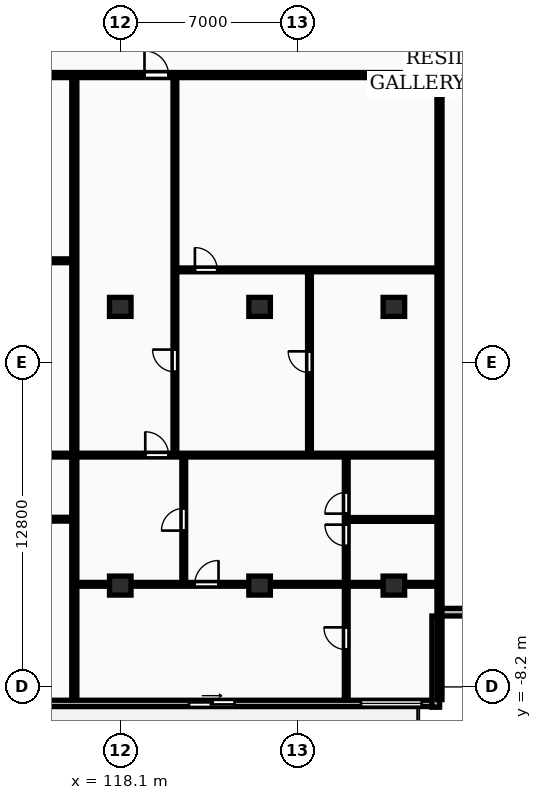
"""IFC4 building model, lengths in metres.
Left out: names, types, materials, properties, quantities, classifications, styles, units other than length and angle.
Written with IfcOpenShell. Run it as: python <this file> out.ifc"""

import sys

from ifc_helpers import new_model, si_unit, direction, frame, frame_2d, origin, origin_2d, place, context, subcontext, project, spatial, rectangle, extrude, element, fill, save


model = new_model("IFC4")
c1 = context("Model", 3, precision=1e-05, world=origin(), true_north=direction((0.0, 1.0)))
c2 = subcontext(c1, "Body", "Model", "MODEL_VIEW")
j1 = project(units=[si_unit("LENGTHUNIT", "METRE"), si_unit("PLANEANGLEUNIT", "RADIAN")], contexts=[c1])
p1 = place(None, origin())
s1 = spatial("IfcSite", under=j1, at=p1, CompositionType="ELEMENT")
p2 = place(p1, origin())
s2 = spatial("IfcBuilding", under=s1, at=p2, CompositionType="ELEMENT")
p3 = place(p2, frame((0.0, 0.0, 126.3)))
s3 = spatial("IfcBuildingStorey", under=s2, at=p3, CompositionType="ELEMENT", Elevation=126.3)
for number, where, z_axis, x_axis in (
    (1, (118.1, -4.2, 0.0), (0.0, 0.0, 1.0), (1.0, 0.0, 0.0)),
    (2, (118.1, 6.8, 0.0), (0.0, 0.0, 1.0), (1.0, 0.0, 0.0)),
    (3, (123.6, -4.2, 0.0), (0.0, 0.0, 1.0), (1.0, 0.0, 0.0)),
    (4, (123.6, 6.8, 0.0), (0.0, 0.0, 1.0), (1.0, 0.0, 0.0)),
    (5, (128.9, -4.2, 0.0), (0.0, 0.0, 1.0), (1.0, 0.0, 0.0)),
    (6, (128.9, 6.8, 0.0), (0.0, 0.0, 1.0), (1.0, 0.0, 0.0)),
):
    element("IfcColumn", number, at=place(p3, frame(where, z_axis=z_axis, x_axis=x_axis)), inside=s3, PredefinedType="COLUMN", context=c2, shape_type="SweptSolid", body=[
        extrude(rectangle(XDim=0.85, YDim=0.75, at=origin_2d()), origin(), (0.0, 0.0, 1.0), 3.25),
    ])
p4 = place(p3, frame((72.7, -8.85, 0.0), z_axis=(0.0, 0.0, 1.0), x_axis=(1.0, 0.0, 0.0)))
e7 = element("IfcWall", 7, at=p4, inside=s3, PredefinedType="STANDARD", context=c2, shape_type="SweptSolid", body=[
    extrude(rectangle(XDim=58.0, YDim=0.25, at=frame_2d((29.0, 0.0))), origin(), (0.0, 0.0, 1.0), 2.97),
])
p5 = place(p4, frame((5.77, 0.0, 0.85)))
e8 = element("IfcOpeningElement", 8, at=p5, cuts=e7, PredefinedType="OPENING", context=c2, shape_type="SweptSolid", body=[
    extrude(rectangle(XDim=2.4, YDim=1.9, at=frame_2d((1.2, 0.95))), frame((0.0, 0.135, 0.0), z_axis=(0.0, -1.0, 0.0), x_axis=(1.0, 0.0, 0.0)), (0.0, 0.0, 1.0), 0.27),
])
p6 = place(p4, frame((10.97, 0.0, 0.85)))
e9 = element("IfcOpeningElement", 9, at=p6, cuts=e7, PredefinedType="OPENING", context=c2, shape_type="SweptSolid", body=[
    extrude(rectangle(XDim=2.4, YDim=1.9, at=frame_2d((1.2, 0.95))), frame((0.0, 0.135, 0.0), z_axis=(0.0, -1.0, 0.0), x_axis=(1.0, 0.0, 0.0)), (0.0, 0.0, 1.0), 0.27),
])
p7 = place(p4, frame((16.387, 0.0, 0.85)))
e10 = element("IfcOpeningElement", 10, at=p7, cuts=e7, PredefinedType="OPENING", context=c2, shape_type="SweptSolid", body=[
    extrude(rectangle(XDim=2.4, YDim=1.9, at=frame_2d((1.2, 0.95))), frame((0.0, 0.135, 0.0), z_axis=(0.0, -1.0, 0.0), x_axis=(1.0, 0.0, 0.0)), (0.0, 0.0, 1.0), 0.27),
])
p8 = place(p4, frame((1.345, 0.0, 0.0)))
e11 = element("IfcOpeningElement", 11, at=p8, cuts=e7, PredefinedType="OPENING", context=c2, shape_type="SweptSolid", body=[
    extrude(rectangle(XDim=1.8, YDim=2.2, at=frame_2d((0.9, 1.1))), frame((0.0, 0.135, 0.0), z_axis=(0.0, -1.0, 0.0), x_axis=(1.0, 0.0, 0.0)), (0.0, 0.0, 1.0), 0.27),
])
p9 = place(p4, frame((21.419, 0.0, 0.85)))
e12 = element("IfcOpeningElement", 12, at=p9, cuts=e7, PredefinedType="OPENING", context=c2, shape_type="SweptSolid", body=[
    extrude(rectangle(XDim=2.4, YDim=1.9, at=frame_2d((1.2, 0.95))), frame((0.0, 0.135, 0.0), z_axis=(0.0, -1.0, 0.0), x_axis=(1.0, 0.0, 0.0)), (0.0, 0.0, 1.0), 0.27),
])
p10 = place(p4, frame((30.827, 0.0, 0.85)))
e13 = element("IfcOpeningElement", 13, at=p10, cuts=e7, PredefinedType="OPENING", context=c2, shape_type="SweptSolid", body=[
    extrude(rectangle(XDim=2.4, YDim=1.9, at=frame_2d((1.2, 0.95))), frame((0.0, 0.135, 0.0), z_axis=(0.0, -1.0, 0.0), x_axis=(1.0, 0.0, 0.0)), (0.0, 0.0, 1.0), 0.27),
])
p11 = place(p4, frame((35.688, 0.0, 0.85)))
e14 = element("IfcOpeningElement", 14, at=p11, cuts=e7, PredefinedType="OPENING", context=c2, shape_type="SweptSolid", body=[
    extrude(rectangle(XDim=2.4, YDim=1.9, at=frame_2d((1.2, 0.95))), frame((0.0, 0.135, 0.0), z_axis=(0.0, -1.0, 0.0), x_axis=(1.0, 0.0, 0.0)), (0.0, 0.0, 1.0), 0.27),
])
p12 = place(p4, frame((26.405, 0.0, 0.0)))
e15 = element("IfcOpeningElement", 15, at=p12, cuts=e7, PredefinedType="OPENING", context=c2, shape_type="SweptSolid", body=[
    extrude(rectangle(XDim=1.8, YDim=2.2, at=frame_2d((0.9, 1.1))), frame((0.0, 0.135, 0.0), z_axis=(0.0, -1.0, 0.0), x_axis=(1.0, 0.0, 0.0)), (0.0, 0.0, 1.0), 0.27),
])
p13 = place(p4, frame((40.161, 0.0, 0.85)))
e16 = element("IfcOpeningElement", 16, at=p13, cuts=e7, PredefinedType="OPENING", context=c2, shape_type="SweptSolid", body=[
    extrude(rectangle(XDim=2.4, YDim=1.9, at=frame_2d((1.2, 0.95))), frame((0.0, 0.135, 0.0), z_axis=(0.0, -1.0, 0.0), x_axis=(1.0, 0.0, 0.0)), (0.0, 0.0, 1.0), 0.27),
])
p14 = place(p4, frame((48.113, 0.0, 0.0)))
e17 = element("IfcOpeningElement", 17, at=p14, cuts=e7, PredefinedType="OPENING", context=c2, shape_type="SweptSolid", body=[
    extrude(rectangle(XDim=1.8, YDim=2.2, at=frame_2d((0.9, 1.1))), frame((0.0, 0.135, 0.0), z_axis=(0.0, -1.0, 0.0), x_axis=(1.0, 0.0, 0.0)), (0.0, 0.0, 1.0), 0.27),
])
p15 = place(p4, frame((54.9, 0.0, 0.85)))
e18 = element("IfcOpeningElement", 18, at=p15, cuts=e7, PredefinedType="OPENING", context=c2, shape_type="SweptSolid", body=[
    extrude(rectangle(XDim=2.4, YDim=1.9, at=frame_2d((1.2, 0.95))), frame((0.0, 0.135, 0.0), z_axis=(0.0, -1.0, 0.0), x_axis=(1.0, 0.0, 0.0)), (0.0, 0.0, 1.0), 0.27),
])
for number, where, z_axis, x_axis in (
    (19, (130.55, -9.0, 0.0), (0.0, 0.0, 1.0), (0.0, 1.0, 0.0)),
    (20, (130.7, -5.25, 0.0), (0.0, 0.0, 1.0), (1.0, 0.0, 0.0)),
):
    element("IfcWall", number, at=place(p3, frame(where, z_axis=z_axis, x_axis=x_axis)), inside=s3, PredefinedType="STANDARD", context=c2, shape_type="SweptSolid", body=[
        extrude(rectangle(XDim=3.6, YDim=0.3, at=frame_2d((1.8, 0.0))), origin(), (0.0, 0.0, 1.0), 2.97),
    ])
for number, where, z_axis, x_axis in (
    (21, (130.7, -8.7, 0.0), (0.0, 0.0, 1.0), (0.0, 1.0, 0.0)),
    (22, (116.286, -8.7, 0.0), (0.0, 0.0, 1.0), (0.0, 1.0, 0.0)),
):
    element("IfcWall", number, at=place(p3, frame(where, z_axis=z_axis, x_axis=x_axis)), inside=s3, PredefinedType="PARTITIONING", context=c2, shape_type="SweptSolid", body=[
        extrude(rectangle(XDim=24.57, YDim=0.2, at=frame_2d((12.285, 0.0))), origin(), (0.0, 0.0, 1.0), 2.97),
    ])
p16 = place(p3, frame((101.685, 8.62, 0.0), z_axis=(0.0, 0.0, 1.0), x_axis=(1.0, 0.0, 0.0)))
e23 = element("IfcWall", 23, at=p16, inside=s3, PredefinedType="PARTITIONING", context=c2, shape_type="SweptSolid", body=[
    extrude(rectangle(XDim=14.522, YDim=0.15, at=frame_2d((7.261, 0.0))), origin(), (0.0, 0.0, 1.0), 2.97),
])
p17 = place(p16, frame((4.903, 0.0, 0.0)))
e24 = element("IfcOpeningElement", 24, at=p17, cuts=e23, PredefinedType="OPENING", context=c2, shape_type="SweptSolid", body=[
    extrude(rectangle(XDim=0.88, YDim=2.06, at=frame_2d((0.44, 1.03))), frame((0.0, 0.085, 0.0), z_axis=(0.0, -1.0, 0.0), x_axis=(1.0, 0.0, 0.0)), (0.0, 0.0, 1.0), 0.17),
])
p18 = place(p3, frame((102.274, -1.58, 0.0), z_axis=(0.0, 0.0, 1.0), x_axis=(1.0, 0.0, 0.0)))
e25 = element("IfcWall", 25, at=p18, inside=s3, PredefinedType="PARTITIONING", context=c2, shape_type="SweptSolid", body=[
    extrude(rectangle(XDim=13.932, YDim=0.15, at=frame_2d((6.966, 0.0))), origin(), (0.0, 0.0, 1.0), 2.97),
])
p19 = place(p18, frame((1.034, 0.0, 0.0)))
e26 = element("IfcOpeningElement", 26, at=p19, cuts=e25, PredefinedType="OPENING", context=c2, shape_type="SweptSolid", body=[
    extrude(rectangle(XDim=0.84, YDim=2.04, at=frame_2d((0.42, 1.02))), frame((0.0, 0.085, 0.0), z_axis=(0.0, -1.0, 0.0), x_axis=(1.0, 0.0, 0.0)), (0.0, 0.0, 1.0), 0.17),
])
p20 = place(p18, frame((6.546, 0.0, 0.0)))
e27 = element("IfcOpeningElement", 27, at=p20, cuts=e25, PredefinedType="OPENING", context=c2, shape_type="SweptSolid", body=[
    extrude(rectangle(XDim=0.84, YDim=2.04, at=frame_2d((0.42, 1.02))), frame((0.0, 0.085, 0.0), z_axis=(0.0, -1.0, 0.0), x_axis=(1.0, 0.0, 0.0)), (0.0, 0.0, 1.0), 0.17),
])
p21 = place(p18, frame((9.932, 0.0, 0.0)))
e28 = element("IfcOpeningElement", 28, at=p21, cuts=e25, PredefinedType="OPENING", context=c2, shape_type="SweptSolid", body=[
    extrude(rectangle(XDim=0.84, YDim=2.04, at=frame_2d((0.42, 1.02))), frame((0.0, 0.085, 0.0), z_axis=(0.0, -1.0, 0.0), x_axis=(1.0, 0.0, 0.0)), (0.0, 0.0, 1.0), 0.17),
])
p22 = place(p3, frame((97.735, 0.95, 0.0), z_axis=(0.0, 0.0, 1.0), x_axis=(1.0, 0.0, 0.0)))
e29 = element("IfcWall", 29, at=p22, inside=s3, PredefinedType="PARTITIONING", context=c2, shape_type="SweptSolid", body=[
    extrude(rectangle(XDim=18.472, YDim=0.15, at=frame_2d((9.236, 0.0))), origin(), (0.0, 0.0, 1.0), 2.97),
])
p23 = place(p22, frame((2.72, 0.0, 0.0)))
e30 = element("IfcOpeningElement", 30, at=p23, cuts=e29, PredefinedType="OPENING", context=c2, shape_type="SweptSolid", body=[
    extrude(rectangle(XDim=0.92, YDim=2.08, at=frame_2d((0.46, 1.04))), frame((0.0, 0.085, 0.0), z_axis=(0.0, -1.0, 0.0), x_axis=(1.0, 0.0, 0.0)), (0.0, 0.0, 1.0), 0.17),
])
p24 = place(p3, frame((125.568, 0.99, 0.0), z_axis=(0.0, 0.0, 1.0), x_axis=(0.0, 1.0, 0.0)))
e31 = element("IfcWall", 31, at=p24, inside=s3, PredefinedType="PARTITIONING", context=c2, shape_type="SweptSolid", body=[
    extrude(rectangle(XDim=7.27, YDim=0.15, at=frame_2d((3.635, 0.0))), origin(), (0.0, 0.0, 1.0), 2.97),
])
p25 = place(p24, frame((3.215, 0.0, 0.0)))
e32 = element("IfcOpeningElement", 32, at=p25, cuts=e31, PredefinedType="OPENING", context=c2, shape_type="SweptSolid", body=[
    extrude(rectangle(XDim=0.84, YDim=2.04, at=frame_2d((0.42, 1.02))), frame((0.0, 0.085, 0.0), z_axis=(0.0, -1.0, 0.0), x_axis=(1.0, 0.0, 0.0)), (0.0, 0.0, 1.0), 0.17),
])
p26 = place(p3, frame((120.316, 8.26, 0.0), z_axis=(0.0, 0.0, 1.0), x_axis=(1.0, 0.0, 0.0)))
e33 = element("IfcWall", 33, at=p26, inside=s3, PredefinedType="PARTITIONING", context=c2, shape_type="SweptSolid", body=[
    extrude(rectangle(XDim=10.304, YDim=0.15, at=frame_2d((5.152, 0.0))), origin(), (0.0, 0.0, 1.0), 2.97),
])
p27 = place(p26, frame((0.73, 0.0, 0.0)))
e34 = element("IfcOpeningElement", 34, at=p27, cuts=e33, PredefinedType="OPENING", context=c2, shape_type="SweptSolid", body=[
    extrude(rectangle(XDim=0.88, YDim=2.06, at=frame_2d((0.44, 1.03))), frame((0.0, 0.085, 0.0), z_axis=(0.0, -1.0, 0.0), x_axis=(1.0, 0.0, 0.0)), (0.0, 0.0, 1.0), 0.17),
])
p28 = place(p3, frame((120.256, 0.99, 0.0), z_axis=(0.0, 0.0, 1.0), x_axis=(0.0, 1.0, 0.0)))
e35 = element("IfcWall", 35, at=p28, inside=s3, PredefinedType="PARTITIONING", context=c2, shape_type="SweptSolid", body=[
    extrude(rectangle(XDim=14.9, YDim=0.15, at=frame_2d((7.45, 0.0))), origin(), (0.0, 0.0, 1.0), 2.97),
])
p29 = place(p28, frame((3.245, 0.0, 0.0)))
e36 = element("IfcOpeningElement", 36, at=p29, cuts=e35, PredefinedType="OPENING", context=c2, shape_type="SweptSolid", body=[
    extrude(rectangle(XDim=0.88, YDim=2.06, at=frame_2d((0.44, 1.03))), frame((0.0, 0.085, 0.0), z_axis=(0.0, -1.0, 0.0), x_axis=(1.0, 0.0, 0.0)), (0.0, 0.0, 1.0), 0.17),
])
p30 = place(p3, frame((120.606, -4.09, 0.0), z_axis=(0.0, 0.0, 1.0), x_axis=(0.0, 1.0, 0.0)))
e37 = element("IfcWall", 37, at=p30, inside=s3, PredefinedType="PARTITIONING", context=c2, shape_type="SweptSolid", body=[
    extrude(rectangle(XDim=5.0, YDim=0.15, at=frame_2d((2.5, 0.0))), origin(), (0.0, 0.0, 1.0), 2.97),
])
p31 = place(p30, frame((2.06, 0.0, 0.0)))
e38 = element("IfcOpeningElement", 38, at=p31, cuts=e37, PredefinedType="OPENING", context=c2, shape_type="SweptSolid", body=[
    extrude(rectangle(XDim=0.88, YDim=2.06, at=frame_2d((0.44, 1.03))), frame((0.0, 0.085, 0.0), z_axis=(0.0, -1.0, 0.0), x_axis=(1.0, 0.0, 0.0)), (0.0, 0.0, 1.0), 0.17),
])
p32 = place(p3, frame((127.08, -1.59, 0.0), z_axis=(0.0, 0.0, 1.0), x_axis=(1.0, 0.0, 0.0)))
e39 = element("IfcWall", 39, at=p32, inside=s3, PredefinedType="PARTITIONING", context=c2, shape_type="SweptSolid", body=[
    extrude(rectangle(XDim=3.54, YDim=0.15, at=frame_2d((1.77, 0.0))), origin(), (0.0, 0.0, 1.0), 2.97),
])
p33 = place(p3, frame((127.02, -8.7, 0.0), z_axis=(0.0, 0.0, 1.0), x_axis=(0.0, 1.0, 0.0)))
e40 = element("IfcWall", 40, at=p33, inside=s3, PredefinedType="PARTITIONING", context=c2, shape_type="SweptSolid", body=[
    extrude(rectangle(XDim=9.61, YDim=0.15, at=frame_2d((4.805, 0.0))), origin(), (0.0, 0.0, 1.0), 2.97),
])
p34 = place(p33, frame((6.065, 0.0, 0.0)))
e41 = element("IfcOpeningElement", 41, at=p34, cuts=e40, PredefinedType="OPENING", context=c2, shape_type="SweptSolid", body=[
    extrude(rectangle(XDim=0.84, YDim=2.04, at=frame_2d((0.42, 1.02))), frame((0.0, 0.085, 0.0), z_axis=(0.0, -1.0, 0.0), x_axis=(1.0, 0.0, 0.0)), (0.0, 0.0, 1.0), 0.17),
])
p35 = place(p33, frame((7.34, 0.0, 0.0)))
e42 = element("IfcOpeningElement", 42, at=p35, cuts=e40, PredefinedType="OPENING", context=c2, shape_type="SweptSolid", body=[
    extrude(rectangle(XDim=0.84, YDim=2.04, at=frame_2d((0.42, 1.02))), frame((0.0, 0.085, 0.0), z_axis=(0.0, -1.0, 0.0), x_axis=(1.0, 0.0, 0.0)), (0.0, 0.0, 1.0), 0.17),
])
p36 = place(p33, frame((1.971, 0.0, 0.0)))
e43 = element("IfcOpeningElement", 43, at=p36, cuts=e40, PredefinedType="OPENING", context=c2, shape_type="SweptSolid", body=[
    extrude(rectangle(XDim=0.88, YDim=2.06, at=frame_2d((0.44, 1.03))), frame((0.0, 0.085, 0.0), z_axis=(0.0, -1.0, 0.0), x_axis=(1.0, 0.0, 0.0)), (0.0, 0.0, 1.0), 0.17),
])
p37 = place(p3, frame((116.366, 0.95, 0.0), z_axis=(0.0, 0.0, 1.0), x_axis=(1.0, 0.0, 0.0)))
e44 = element("IfcWall", 44, at=p37, inside=s3, PredefinedType="PARTITIONING", context=c2, shape_type="SweptSolid", body=[
    extrude(rectangle(XDim=14.254, YDim=0.15, at=frame_2d((7.127, 0.0))), origin(), (0.0, 0.0, 1.0), 2.97),
])
p38 = place(p37, frame((2.72, 0.0, 0.0)))
e45 = element("IfcOpeningElement", 45, at=p38, cuts=e44, PredefinedType="OPENING", context=c2, shape_type="SweptSolid", body=[
    extrude(rectangle(XDim=0.92, YDim=2.08, at=frame_2d((0.46, 1.04))), frame((0.0, 0.085, 0.0), z_axis=(0.0, -1.0, 0.0), x_axis=(1.0, 0.0, 0.0)), (0.0, 0.0, 1.0), 0.17),
])
p39 = place(p3, frame((116.366, -4.15, 0.0), z_axis=(0.0, 0.0, 1.0), x_axis=(1.0, 0.0, 0.0)))
e46 = element("IfcWall", 46, at=p39, inside=s3, PredefinedType="PARTITIONING", context=c2, shape_type="SweptSolid", body=[
    extrude(rectangle(XDim=14.254, YDim=0.15, at=frame_2d((7.127, 0.0))), origin(), (0.0, 0.0, 1.0), 2.663),
])
p40 = place(p39, frame((4.673, 0.0, 0.0)))
e47 = element("IfcOpeningElement", 47, at=p40, cuts=e46, PredefinedType="OPENING", context=c2, shape_type="SweptSolid", body=[
    extrude(rectangle(XDim=0.94, YDim=2.1, at=frame_2d((0.47, 1.05))), frame((0.0, 0.085, 0.0), z_axis=(0.0, -1.0, 0.0), x_axis=(1.0, 0.0, 0.0)), (0.0, 0.0, 1.0), 0.17),
])
p41 = place(p3, frame((72.7, 15.95, 0.0), z_axis=(0.0, 0.0, 1.0), x_axis=(1.0, 0.0, 0.0)))
e48 = element("IfcWall", 48, at=p41, inside=s3, PredefinedType="PARTITIONING", context=c2, shape_type="SweptSolid", body=[
    extrude(rectangle(XDim=58.0, YDim=0.2, at=frame_2d((29.0, 0.0))), origin(), (0.0, 0.0, 1.0), 2.97),
])
p42 = place(p41, frame((2.77, 0.0, 0.0)))
e49 = element("IfcOpeningElement", 49, at=p42, cuts=e48, PredefinedType="OPENING", context=c2, shape_type="SweptSolid", body=[
    extrude(rectangle(XDim=0.95, YDim=2.15, at=frame_2d((0.475, 1.075))), frame((0.0, 0.11, 0.0), z_axis=(0.0, -1.0, 0.0), x_axis=(1.0, 0.0, 0.0)), (0.0, 0.0, 1.0), 0.22),
])
p43 = place(p41, frame((25.324, 0.0, 0.0)))
e50 = element("IfcOpeningElement", 50, at=p43, cuts=e48, PredefinedType="OPENING", context=c2, shape_type="SweptSolid", body=[
    extrude(rectangle(XDim=0.95, YDim=2.15, at=frame_2d((0.475, 1.075))), frame((0.0, 0.11, 0.0), z_axis=(0.0, -1.0, 0.0), x_axis=(1.0, 0.0, 0.0)), (0.0, 0.0, 1.0), 0.22),
])
p44 = place(p41, frame((46.356, 0.0, 0.0)))
e51 = element("IfcOpeningElement", 51, at=p44, cuts=e48, PredefinedType="OPENING", context=c2, shape_type="SweptSolid", body=[
    extrude(rectangle(XDim=0.95, YDim=2.15, at=frame_2d((0.475, 1.075))), frame((0.0, 0.11, 0.0), z_axis=(0.0, -1.0, 0.0), x_axis=(1.0, 0.0, 0.0)), (0.0, 0.0, 1.0), 0.22),
])
p45 = place(p14, origin())
e52 = element("IfcDoor", 52, at=p45, inside=s3, OperationType="SLIDING_TO_RIGHT", PredefinedType="DOOR", context=c2, shape_type="SweptSolid", body=[
    extrude(rectangle(XDim=1.8, YDim=2.2, at=frame_2d((0.9, 1.1))), frame((0.0, 0.025, 0.0), z_axis=(0.0, -1.0, 0.0), x_axis=(1.0, 0.0, 0.0)), (0.0, 0.0, 1.0), 0.05),
])
fill(e17, e52)
p46 = place(p15, origin())
e53 = element("IfcWindow", 53, at=p46, inside=s3, PartitioningType="DOUBLE_PANEL_VERTICAL", PredefinedType="WINDOW", context=c2, shape_type="SweptSolid", body=[
    extrude(rectangle(XDim=2.4, YDim=1.9, at=frame_2d((1.2, 0.95))), frame((0.0, 0.03, 0.0), z_axis=(0.0, -1.0, 0.0), x_axis=(1.0, 0.0, 0.0)), (0.0, 0.0, 1.0), 0.06),
])
fill(e18, e53)
p47 = place(p25, origin())
e54 = element("IfcDoor", 54, at=p47, inside=s3, OperationType="SINGLE_SWING_RIGHT", PredefinedType="DOOR", context=c2, shape_type="SweptSolid", body=[
    extrude(rectangle(XDim=0.84, YDim=2.04, at=frame_2d((0.42, 1.02))), frame((0.0, 0.025, 0.0), z_axis=(0.0, -1.0, 0.0), x_axis=(1.0, 0.0, 0.0)), (0.0, 0.0, 1.0), 0.05),
])
fill(e32, e54)
p48 = place(p27, origin())
e55 = element("IfcDoor", 55, at=p48, inside=s3, OperationType="SINGLE_SWING_LEFT", PredefinedType="DOOR", context=c2, shape_type="SweptSolid", body=[
    extrude(rectangle(XDim=0.88, YDim=2.06, at=frame_2d((0.44, 1.03))), frame((0.0, 0.025, 0.0), z_axis=(0.0, -1.0, 0.0), x_axis=(1.0, 0.0, 0.0)), (0.0, 0.0, 1.0), 0.05),
])
fill(e34, e55)
p49 = place(p29, origin())
e56 = element("IfcDoor", 56, at=p49, inside=s3, OperationType="SINGLE_SWING_RIGHT", PredefinedType="DOOR", context=c2, shape_type="SweptSolid", body=[
    extrude(rectangle(XDim=0.88, YDim=2.06, at=frame_2d((0.44, 1.03))), frame((0.0, 0.025, 0.0), z_axis=(0.0, -1.0, 0.0), x_axis=(1.0, 0.0, 0.0)), (0.0, 0.0, 1.0), 0.05),
])
fill(e36, e56)
p50 = place(p31, origin())
e57 = element("IfcDoor", 57, at=p50, inside=s3, OperationType="SINGLE_SWING_LEFT", PredefinedType="DOOR", context=c2, shape_type="SweptSolid", body=[
    extrude(rectangle(XDim=0.88, YDim=2.06, at=frame_2d((0.44, 1.03))), frame((0.0, 0.025, 0.0), z_axis=(0.0, -1.0, 0.0), x_axis=(1.0, 0.0, 0.0)), (0.0, 0.0, 1.0), 0.05),
])
fill(e38, e57)
p51 = place(p34, origin())
e58 = element("IfcDoor", 58, at=p51, inside=s3, OperationType="SINGLE_SWING_RIGHT", PredefinedType="DOOR", context=c2, shape_type="SweptSolid", body=[
    extrude(rectangle(XDim=0.84, YDim=2.04, at=frame_2d((0.42, 1.02))), frame((0.0, 0.025, 0.0), z_axis=(0.0, -1.0, 0.0), x_axis=(1.0, 0.0, 0.0)), (0.0, 0.0, 1.0), 0.05),
])
fill(e41, e58)
p52 = place(p35, origin())
e59 = element("IfcDoor", 59, at=p52, inside=s3, OperationType="SINGLE_SWING_LEFT", PredefinedType="DOOR", context=c2, shape_type="SweptSolid", body=[
    extrude(rectangle(XDim=0.84, YDim=2.04, at=frame_2d((0.42, 1.02))), frame((0.0, 0.025, 0.0), z_axis=(0.0, -1.0, 0.0), x_axis=(1.0, 0.0, 0.0)), (0.0, 0.0, 1.0), 0.05),
])
fill(e42, e59)
p53 = place(p36, origin())
e60 = element("IfcDoor", 60, at=p53, inside=s3, OperationType="SINGLE_SWING_RIGHT", PredefinedType="DOOR", context=c2, shape_type="SweptSolid", body=[
    extrude(rectangle(XDim=0.88, YDim=2.06, at=frame_2d((0.44, 1.03))), frame((0.0, 0.025, 0.0), z_axis=(0.0, -1.0, 0.0), x_axis=(1.0, 0.0, 0.0)), (0.0, 0.0, 1.0), 0.05),
])
fill(e43, e60)
p54 = place(p38, origin())
e61 = element("IfcDoor", 61, at=p54, inside=s3, OperationType="SINGLE_SWING_LEFT", PredefinedType="DOOR", context=c2, shape_type="SweptSolid", body=[
    extrude(rectangle(XDim=0.92, YDim=2.08, at=frame_2d((0.46, 1.04))), frame((0.0, 0.025, 0.0), z_axis=(0.0, -1.0, 0.0), x_axis=(1.0, 0.0, 0.0)), (0.0, 0.0, 1.0), 0.05),
])
fill(e45, e61)
p55 = place(p40, origin())
e62 = element("IfcDoor", 62, at=p55, inside=s3, OperationType="SINGLE_SWING_RIGHT", PredefinedType="DOOR", context=c2, shape_type="SweptSolid", body=[
    extrude(rectangle(XDim=0.94, YDim=2.1, at=frame_2d((0.47, 1.05))), frame((0.0, 0.025, 0.0), z_axis=(0.0, -1.0, 0.0), x_axis=(1.0, 0.0, 0.0)), (0.0, 0.0, 1.0), 0.05),
])
fill(e47, e62)
p56 = place(p44, origin())
e63 = element("IfcDoor", 63, at=p56, inside=s3, OperationType="SINGLE_SWING_LEFT", PredefinedType="DOOR", context=c2, shape_type="SweptSolid", body=[
    extrude(rectangle(XDim=0.95, YDim=2.15, at=frame_2d((0.475, 1.075))), frame((0.0, 0.025, 0.0), z_axis=(0.0, -1.0, 0.0), x_axis=(1.0, 0.0, 0.0)), (0.0, 0.0, 1.0), 0.05),
])
fill(e51, e63)
save(model, sys.argv[1])
